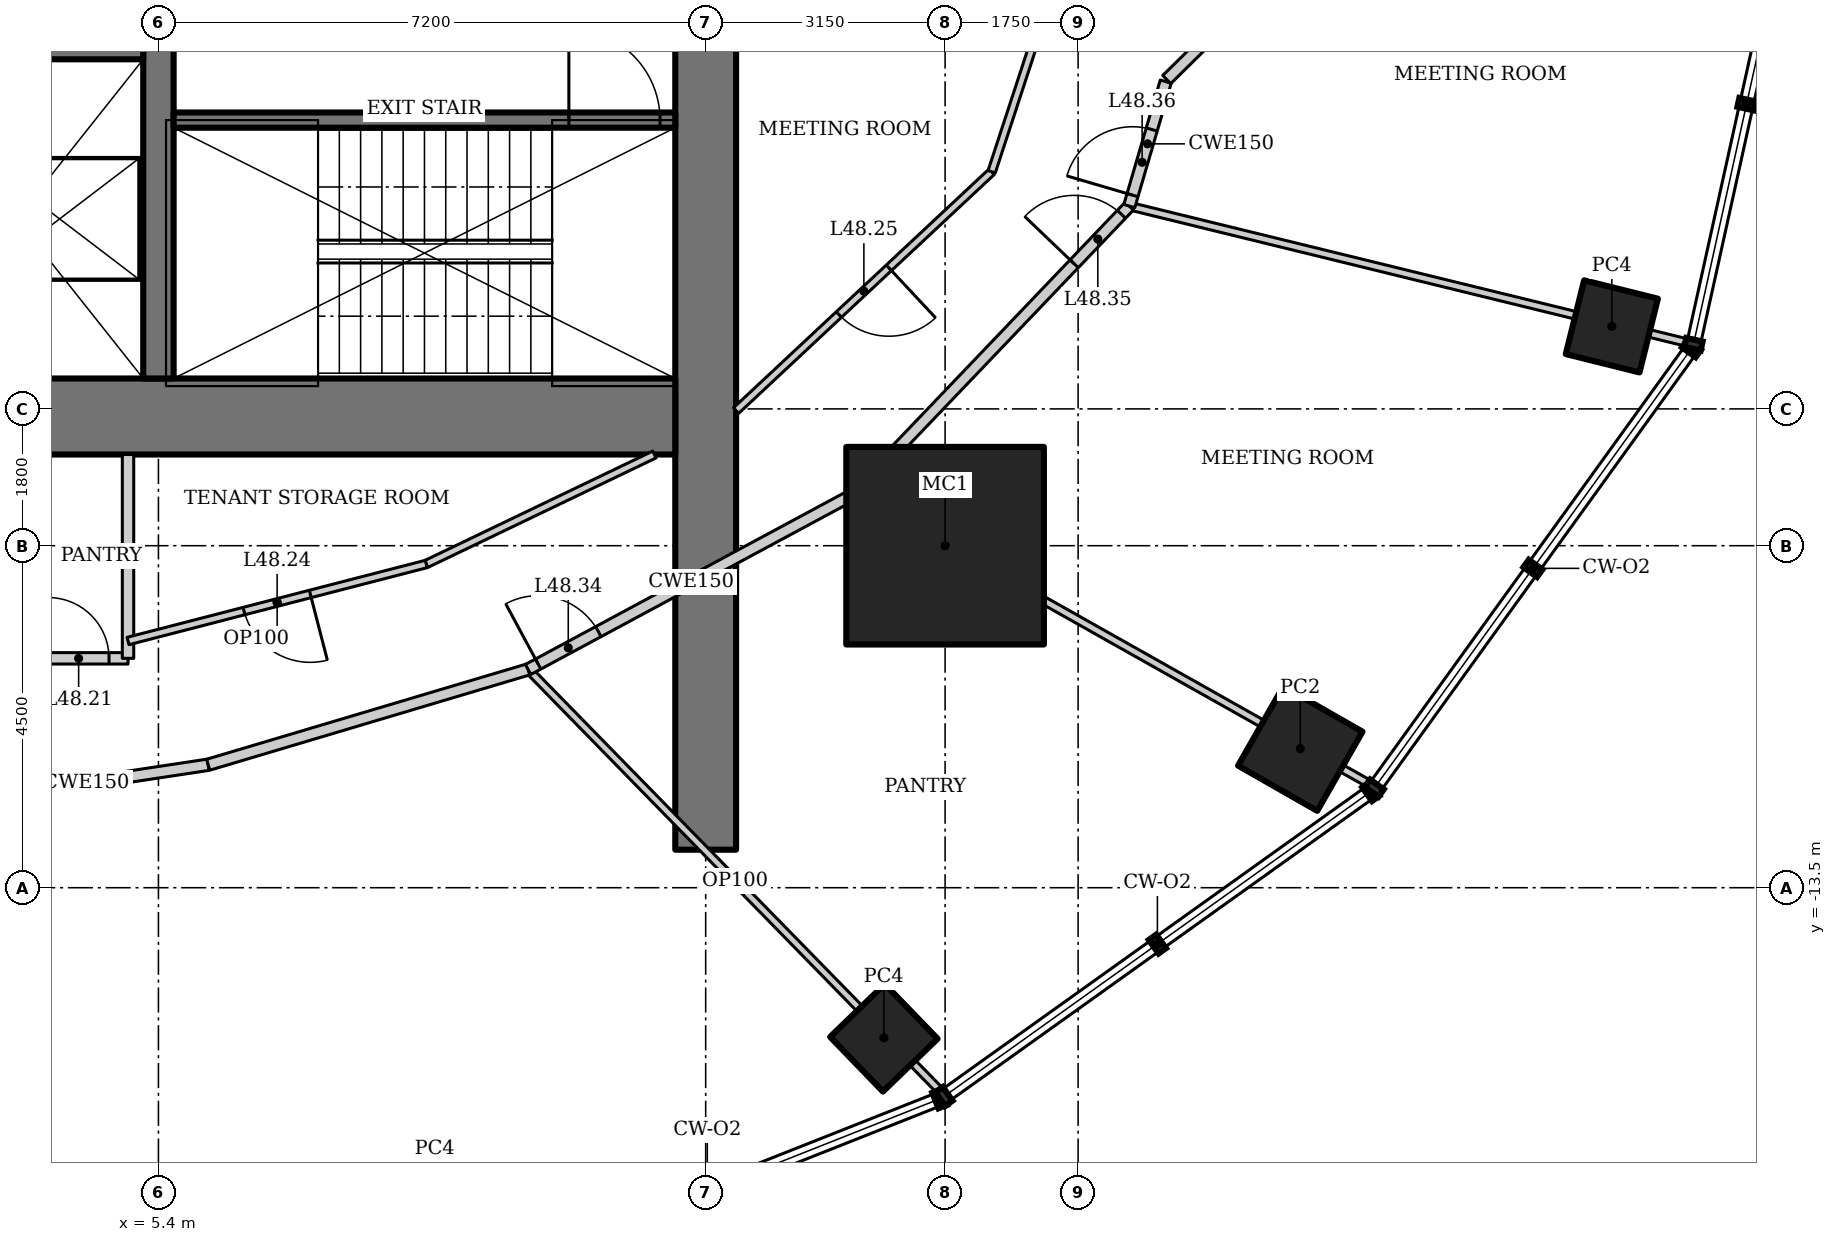
"""IFC4 building model, lengths in metres.
Left out: names, types, materials, properties, quantities, classifications, styles, units other than length and angle.
Written with IfcOpenShell. Run it as: python <this file> out.ifc"""

import sys

from ifc_helpers import new_model, si_unit, direction, frame, frame_2d, origin, origin_2d, place, context, subcontext, project, spatial, rectangle, hollow_rectangle, extrude, element, fill, save


model = new_model("IFC4")
c1 = context("Model", 3, precision=1e-05, world=origin(), true_north=direction((0.0, 1.0)))
c2 = subcontext(c1, "Body", "Model", "MODEL_VIEW")
j1 = project(units=[si_unit("LENGTHUNIT", "METRE"), si_unit("PLANEANGLEUNIT", "RADIAN")], contexts=[c1])
p1 = place(None, origin())
s1 = spatial("IfcSite", under=j1, at=p1, CompositionType="ELEMENT")
p2 = place(p1, origin())
s2 = spatial("IfcBuilding", under=s1, at=p2, CompositionType="ELEMENT")
p3 = place(p2, frame((0.0, 0.0, 207.4)))
s3 = spatial("IfcBuildingStorey", under=s2, at=p3, CompositionType="ELEMENT", Elevation=207.4)
p4 = place(p3, frame((15.75, -9.0, 0.0), z_axis=(0.0, 0.0, 1.0), x_axis=(1.0, 0.0, 0.0)))
e1 = element("IfcColumn", 1, at=p4, inside=s3, PredefinedType="COLUMN", context=c2, shape_type="SweptSolid", body=[
    extrude(hollow_rectangle(XDim=2.6, YDim=2.6, WallThickness=0.13, at=origin_2d()), origin(), (0.0, 0.0, 1.0), 4.2),
])
for number, where, z_axis, x_axis in (
    (2, (9.035, -17.731, 0.0), (0.0, 0.0, 1.0), (0.891, 0.454, 0.0)),
    (3, (14.944, -15.475, 0.0), (0.0, 0.0, 1.0), (0.719, 0.695, 0.0)),
):
    element("IfcColumn", number, at=place(p3, frame(where, z_axis=z_axis, x_axis=x_axis)), inside=s3, PredefinedType="COLUMN", context=c2, shape_type="SweptSolid", body=[
        extrude(hollow_rectangle(XDim=1.0, YDim=1.0, WallThickness=0.08, at=origin_2d()), origin(), (0.0, 0.0, 1.0), 4.2),
    ])
p5 = place(p3, frame((20.423, -11.67, 0.0), z_axis=(0.0, 0.0, 1.0), x_axis=(0.496139221777, 0.86824298017, 0.0)))
e4 = element("IfcColumn", 4, at=p5, inside=s3, PredefinedType="COLUMN", context=c2, shape_type="SweptSolid", body=[
    extrude(hollow_rectangle(XDim=1.2, YDim=1.2, WallThickness=0.1, at=origin_2d()), origin(), (0.0, 0.0, 1.0), 4.2),
])
p6 = place(p3, frame((24.522, -6.114, 0.0), z_axis=(0.0, 0.0, 1.0), x_axis=(0.2419218956, 0.970295726276, 0.0)))
e5 = element("IfcColumn", 5, at=p6, inside=s3, PredefinedType="COLUMN", context=c2, shape_type="SweptSolid", body=[
    extrude(hollow_rectangle(XDim=1.0, YDim=1.0, WallThickness=0.08, at=origin_2d()), origin(), (0.0, 0.0, 1.0), 4.2),
])
p7 = place(p3, frame((12.6, -13.0, 0.0), z_axis=(0.0, 0.0, 1.0), x_axis=(0.0, 1.0, 0.0)))
e6 = element("IfcWall", 6, at=p7, inside=s3, PredefinedType="SHEAR", context=c2, shape_type="SweptSolid", body=[
    extrude(rectangle(XDim=26.0, YDim=0.8, at=frame_2d((13.0, 0.0))), origin(), (0.0, 0.0, 1.0), 4.2),
])
p8 = place(p7, frame((12.1, 0.0, 0.0)))
e7 = element("IfcOpeningElement", 7, at=p8, cuts=e6, PredefinedType="OPENING", context=c2, shape_type="SweptSolid", body=[
    extrude(rectangle(XDim=1.8, YDim=2.1, at=frame_2d((0.9, 1.05))), frame((0.0, 0.41, 0.0), z_axis=(0.0, -1.0, 0.0), x_axis=(1.0, 0.0, 0.0)), (0.0, 0.0, 1.0), 0.82),
])
p9 = place(p3, frame((-12.2, -7.3, 0.0), z_axis=(0.0, 0.0, 1.0), x_axis=(1.0, 0.0, 0.0)))
e8 = element("IfcWall", 8, at=p9, inside=s3, PredefinedType="SHEAR", context=c2, shape_type="SweptSolid", body=[
    extrude(rectangle(XDim=24.4, YDim=1.0, at=frame_2d((12.2, 0.0))), origin(), (0.0, 0.0, 1.0), 4.2),
])
p10 = place(p3, frame((5.4, -6.8, 0.0), z_axis=(0.0, 0.0, 1.0), x_axis=(0.0, 1.0, 0.0)))
e9 = element("IfcWall", 9, at=p10, inside=s3, PredefinedType="SHEAR", context=c2, shape_type="SweptSolid", body=[
    extrude(rectangle(XDim=14.6, YDim=0.4, at=frame_2d((7.3, 0.0))), origin(), (0.0, 0.0, 1.0), 4.2),
])
p11 = place(p10, frame((5.9, 0.0, 0.0)))
e10 = element("IfcOpeningElement", 10, at=p11, cuts=e9, PredefinedType="OPENING", context=c2, shape_type="SweptSolid", body=[
    extrude(rectangle(XDim=1.8, YDim=2.1, at=frame_2d((0.9, 1.05))), frame((0.0, 0.21, 0.0), z_axis=(0.0, -1.0, 0.0), x_axis=(1.0, 0.0, 0.0)), (0.0, 0.0, 1.0), 0.42),
])
p12 = place(p3, frame((-5.2, -2.4, 0.0), z_axis=(0.0, 0.0, 1.0), x_axis=(1.0, 0.0, 0.0)))
e11 = element("IfcWall", 11, at=p12, inside=s3, PredefinedType="SHEAR", context=c2, shape_type="SweptSolid", body=[
    extrude(rectangle(XDim=10.4, YDim=0.4, at=frame_2d((5.2, 0.0))), origin(), (0.0, 0.0, 1.0), 4.2),
])
p13 = place(p12, frame((1.683, 0.0, 0.0)))
e12 = element("IfcOpeningElement", 12, at=p13, cuts=e11, PredefinedType="OPENING", context=c2, shape_type="SweptSolid", body=[
    extrude(rectangle(XDim=1.1, YDim=2.2, at=frame_2d((0.55, 1.1))), frame((0.0, 0.21, 0.0), z_axis=(0.0, -1.0, 0.0), x_axis=(1.0, 0.0, 0.0)), (0.0, 0.0, 1.0), 0.42),
])
p14 = place(p12, frame((5.217, 0.0, 0.0)))
e13 = element("IfcOpeningElement", 13, at=p14, cuts=e11, PredefinedType="OPENING", context=c2, shape_type="SweptSolid", body=[
    extrude(rectangle(XDim=1.1, YDim=2.2, at=frame_2d((0.55, 1.1))), frame((0.0, 0.21, 0.0), z_axis=(0.0, -1.0, 0.0), x_axis=(1.0, 0.0, 0.0)), (0.0, 0.0, 1.0), 0.42),
])
p15 = place(p12, frame((8.75, 0.0, 0.0)))
e14 = element("IfcOpeningElement", 14, at=p15, cuts=e11, PredefinedType="OPENING", context=c2, shape_type="SweptSolid", body=[
    extrude(rectangle(XDim=1.1, YDim=2.2, at=frame_2d((0.55, 1.1))), frame((0.0, 0.21, 0.0), z_axis=(0.0, -1.0, 0.0), x_axis=(1.0, 0.0, 0.0)), (0.0, 0.0, 1.0), 0.42),
])
p16 = place(p3, frame((5.6, -3.4, 0.0), z_axis=(0.0, 0.0, 1.0), x_axis=(1.0, 0.0, 0.0)))
e15 = element("IfcWall", 15, at=p16, inside=s3, PredefinedType="SHEAR", context=c2, shape_type="SweptSolid", body=[
    extrude(rectangle(XDim=6.6, YDim=0.2, at=frame_2d((3.3, 0.0))), origin(), (0.0, 0.0, 1.0), 4.2),
])
p17 = place(p16, frame((5.2, 0.0, 0.0)))
e16 = element("IfcOpeningElement", 16, at=p17, cuts=e15, PredefinedType="OPENING", context=c2, shape_type="SweptSolid", body=[
    extrude(rectangle(XDim=1.2, YDim=2.1, at=frame_2d((0.6, 1.05))), frame((0.0, 0.11, 0.0), z_axis=(0.0, -1.0, 0.0), x_axis=(1.0, 0.0, 0.0)), (0.0, 0.0, 1.0), 0.22),
])
p18 = place(p3, frame((15.709, -16.199, 0.0), z_axis=(0.0, 0.0, 1.0), x_axis=(-0.699053895446, 0.715068983569, 0.0)))
e17 = element("IfcWall", 17, at=p18, inside=s3, PredefinedType="PARTITIONING", context=c2, shape_type="SweptSolid", body=[
    extrude(rectangle(XDim=7.79, YDim=0.1, at=frame_2d((3.895, 0.0))), origin(), (0.0, 0.0, 1.0), 3.41),
])
p19 = place(p3, frame((21.358, -12.15, 0.0), z_axis=(0.0, 0.0, 1.0), x_axis=(-0.871273053995, 0.490798599614, 0.0)))
e18 = element("IfcWall", 18, at=p19, inside=s3, PredefinedType="PARTITIONING", context=c2, shape_type="SweptSolid", body=[
    extrude(rectangle(XDim=7.807, YDim=0.1, at=frame_2d((3.904, 0.0))), origin(), (0.0, 0.0, 1.0), 3.522),
])
p20 = place(p3, frame((25.543, -6.336, 0.0), z_axis=(0.0, 0.0, 1.0), x_axis=(-0.97130474594, 0.237838370569, 0.0)))
e19 = element("IfcWall", 19, at=p20, inside=s3, PredefinedType="PARTITIONING", context=c2, shape_type="SweptSolid", body=[
    extrude(rectangle(XDim=7.587, YDim=0.1, at=frame_2d((3.793, 0.0))), origin(), (0.0, 0.0, 1.0), 3.108),
])
p21 = place(p3, frame((2.855, -12.365, 0.0), z_axis=(0.0, 0.0, 1.0), x_axis=(0.988800347251, 0.149244340852, 0.0)))
e20 = element("IfcWall", 20, at=p21, inside=s3, PredefinedType="PARTITIONING", context=c2, shape_type="SweptSolid", body=[
    extrude(rectangle(XDim=3.236, YDim=0.15, at=frame_2d((1.618, 0.0))), origin(), (0.0, 0.0, 1.0), 4.05),
])
p22 = place(p3, frame((6.054, -11.882, 0.0), z_axis=(0.0, 0.0, 1.0), x_axis=(0.958384389306, 0.285480931648, 0.0)))
e21 = element("IfcWall", 21, at=p22, inside=s3, PredefinedType="PARTITIONING", context=c2, shape_type="SweptSolid", body=[
    extrude(rectangle(XDim=4.392, YDim=0.15, at=frame_2d((2.196, 0.0))), origin(), (0.0, 0.0, 1.0), 4.05),
])
p23 = place(p3, frame((10.264, -10.628, 0.0), z_axis=(0.0, 0.0, 1.0), x_axis=(0.88053863253, 0.47397438393, 0.0)))
e22 = element("IfcWall", 22, at=p23, inside=s3, PredefinedType="PARTITIONING", context=c2, shape_type="SweptSolid", body=[
    extrude(rectangle(XDim=4.875, YDim=0.15, at=frame_2d((2.438, 0.0))), origin(), (0.0, 0.0, 1.0), 4.05),
])
p24 = place(p23, frame((0.15, 0.0, 0.0)))
e23 = element("IfcOpeningElement", 23, at=p24, cuts=e22, PredefinedType="OPENING", context=c2, shape_type="SweptSolid", body=[
    extrude(rectangle(XDim=0.9, YDim=2.1, at=frame_2d((0.45, 1.05))), frame((0.0, 0.085, 0.0), z_axis=(0.0, -1.0, 0.0), x_axis=(1.0, 0.0, 0.0)), (0.0, 0.0, 1.0), 0.17),
])
p25 = place(p3, frame((14.556, -8.318, 0.0), z_axis=(0.0, 0.0, 1.0), x_axis=(0.690768413292, 0.723076067366, 0.0)))
e24 = element("IfcWall", 24, at=p25, inside=s3, PredefinedType="PARTITIONING", context=c2, shape_type="SweptSolid", body=[
    extrude(rectangle(XDim=5.237, YDim=0.15, at=frame_2d((2.618, 0.0))), origin(), (0.0, 0.0, 1.0), 4.05),
])
p26 = place(p25, frame((4.187, 0.0, 0.0)))
e25 = element("IfcOpeningElement", 25, at=p26, cuts=e24, PredefinedType="OPENING", context=c2, shape_type="SweptSolid", body=[
    extrude(rectangle(XDim=0.9, YDim=2.1, at=frame_2d((0.45, 1.05))), frame((0.0, 0.085, 0.0), z_axis=(0.0, -1.0, 0.0), x_axis=(1.0, 0.0, 0.0)), (0.0, 0.0, 1.0), 0.17),
])
p27 = place(p3, frame((-5.0, -10.482, 0.0), z_axis=(0.0, 0.0, 1.0), x_axis=(1.0, 0.0, 0.0)))
e26 = element("IfcWall", 26, at=p27, inside=s3, PredefinedType="SOLIDWALL", context=c2, shape_type="SweptSolid", body=[
    extrude(rectangle(XDim=10.0, YDim=0.15, at=frame_2d((5.0, 0.0))), origin(), (0.0, 0.0, 1.0), 4.05),
])
p28 = place(p27, frame((1.25, 0.0, 0.0)))
e27 = element("IfcOpeningElement", 27, at=p28, cuts=e26, PredefinedType="OPENING", context=c2, shape_type="SweptSolid", body=[
    extrude(rectangle(XDim=0.9, YDim=2.1, at=frame_2d((0.45, 1.05))), frame((0.0, 0.085, 0.0), z_axis=(0.0, -1.0, 0.0), x_axis=(1.0, 0.0, 0.0)), (0.0, 0.0, 1.0), 0.17),
])
p29 = place(p27, frame((4.65, 0.0, 0.0)))
e28 = element("IfcOpeningElement", 28, at=p29, cuts=e26, PredefinedType="OPENING", context=c2, shape_type="SweptSolid", body=[
    extrude(rectangle(XDim=0.9, YDim=2.1, at=frame_2d((0.45, 1.05))), frame((0.0, 0.085, 0.0), z_axis=(0.0, -1.0, 0.0), x_axis=(1.0, 0.0, 0.0)), (0.0, 0.0, 1.0), 0.17),
])
p30 = place(p27, frame((7.25, 0.0, 0.0)))
e29 = element("IfcOpeningElement", 29, at=p30, cuts=e26, PredefinedType="OPENING", context=c2, shape_type="SweptSolid", body=[
    extrude(rectangle(XDim=1.0, YDim=2.1, at=frame_2d((0.5, 1.05))), frame((0.0, 0.085, 0.0), z_axis=(0.0, -1.0, 0.0), x_axis=(1.0, 0.0, 0.0)), (0.0, 0.0, 1.0), 0.17),
])
p31 = place(p27, frame((8.95, 0.0, 0.0)))
e30 = element("IfcOpeningElement", 30, at=p31, cuts=e26, PredefinedType="OPENING", context=c2, shape_type="SweptSolid", body=[
    extrude(rectangle(XDim=0.8, YDim=2.1, at=frame_2d((0.4, 1.05))), frame((0.0, 0.085, 0.0), z_axis=(0.0, -1.0, 0.0), x_axis=(1.0, 0.0, 0.0)), (0.0, 0.0, 1.0), 0.17),
])
p32 = place(p3, frame((5.0, -7.8, 0.0), z_axis=(0.0, 0.0, 1.0), x_axis=(0.0, -1.0, 0.0)))
e31 = element("IfcWall", 31, at=p32, inside=s3, PredefinedType="SOLIDWALL", context=c2, shape_type="SweptSolid", body=[
    extrude(rectangle(XDim=2.682, YDim=0.15, at=frame_2d((1.341, 0.0))), origin(), (0.0, 0.0, 1.0), 4.05),
])
p33 = place(p3, frame((11.926, -7.8, 0.0), z_axis=(0.0, 0.0, 1.0), x_axis=(-0.901553947207, -0.432666708073, 0.0)))
e32 = element("IfcWall", 32, at=p33, inside=s3, PredefinedType="PARTITIONING", context=c2, shape_type="SweptSolid", body=[
    extrude(rectangle(XDim=3.33, YDim=0.1, at=frame_2d((1.665, 0.0))), origin(), (0.0, 0.0, 1.0), 4.05),
])
p34 = place(p3, frame((8.924, -9.241, 0.0), z_axis=(0.0, 0.0, 1.0), x_axis=(-0.968224167198, -0.250083910027, 0.0)))
e33 = element("IfcWall", 33, at=p34, inside=s3, PredefinedType="PARTITIONING", context=c2, shape_type="SweptSolid", body=[
    extrude(rectangle(XDim=4.052, YDim=0.1, at=frame_2d((2.026, 0.0))), origin(), (0.0, 0.0, 1.0), 4.05),
])
p35 = place(p34, frame((1.576, 0.0, 0.0)))
e34 = element("IfcOpeningElement", 34, at=p35, cuts=e33, PredefinedType="OPENING", context=c2, shape_type="SweptSolid", body=[
    extrude(rectangle(XDim=0.9, YDim=2.1, at=frame_2d((0.45, 1.05))), frame((0.0, 0.06, 0.0), z_axis=(0.0, -1.0, 0.0), x_axis=(1.0, 0.0, 0.0)), (0.0, 0.0, 1.0), 0.12),
])
p36 = place(p3, frame((16.363, -4.08, 0.0), z_axis=(0.0, 0.0, 1.0), x_axis=(-0.730651186567, -0.682750938167, 0.0)))
e35 = element("IfcWall", 35, at=p36, inside=s3, PredefinedType="PARTITIONING", context=c2, shape_type="SweptSolid", body=[
    extrude(rectangle(XDim=4.603, YDim=0.1, at=frame_2d((2.301, 0.0))), origin(), (0.0, 0.0, 1.0), 4.05),
])
p37 = place(p36, frame((1.851, 0.0, 0.0)))
e36 = element("IfcOpeningElement", 36, at=p37, cuts=e35, PredefinedType="OPENING", context=c2, shape_type="SweptSolid", body=[
    extrude(rectangle(XDim=0.9, YDim=2.1, at=frame_2d((0.45, 1.05))), frame((0.0, 0.06, 0.0), z_axis=(0.0, -1.0, 0.0), x_axis=(1.0, 0.0, 0.0)), (0.0, 0.0, 1.0), 0.12),
])
p38 = place(p3, frame((18.174, -4.531, 0.0), z_axis=(0.0, 0.0, 1.0), x_axis=(0.281027335084, 0.959699763955, 0.0)))
e37 = element("IfcWall", 37, at=p38, inside=s3, PredefinedType="PARTITIONING", context=c2, shape_type="SweptSolid", body=[
    extrude(rectangle(XDim=1.706, YDim=0.15, at=frame_2d((0.853, 0.0))), origin(), (0.0, 0.0, 1.0), 4.05),
])
p39 = place(p38, frame((0.15, 0.0, 0.0)))
e38 = element("IfcOpeningElement", 38, at=p39, cuts=e37, PredefinedType="OPENING", context=c2, shape_type="SweptSolid", body=[
    extrude(rectangle(XDim=0.9, YDim=2.1, at=frame_2d((0.45, 1.05))), frame((0.0, 0.085, 0.0), z_axis=(0.0, -1.0, 0.0), x_axis=(1.0, 0.0, 0.0)), (0.0, 0.0, 1.0), 0.17),
])
p40 = place(p3, frame((16.935, -2.335, 0.0), z_axis=(0.0, 0.0, 1.0), x_axis=(-0.311517212063, -0.950240509865, 0.0)))
e39 = element("IfcWall", 39, at=p40, inside=s3, PredefinedType="PARTITIONING", context=c2, shape_type="SweptSolid", body=[
    extrude(rectangle(XDim=1.836, YDim=0.1, at=frame_2d((0.918, 0.0))), origin(), (0.0, 0.0, 1.0), 4.05),
])
p41 = place(p3, frame((19.825, -1.725, 0.0), z_axis=(0.0, 0.0, 1.0), x_axis=(-0.712265481509, -0.701910167935, 0.0)))
e40 = element("IfcWall", 40, at=p41, inside=s3, PredefinedType="PARTITIONING", context=c2, shape_type="SweptSolid", body=[
    extrude(rectangle(XDim=1.627, YDim=0.15, at=frame_2d((0.813, 0.0))), origin(), (0.0, 0.0, 1.0), 4.05),
])
p42 = place(p17, origin())
e41 = element("IfcDoor", 41, at=p42, inside=s3, OperationType="SINGLE_SWING_RIGHT", PredefinedType="DOOR", context=c2, shape_type="SweptSolid", body=[
    extrude(rectangle(XDim=1.2, YDim=2.1, at=frame_2d((0.6, 1.05))), frame((0.0, 0.025, 0.0), z_axis=(0.0, -1.0, 0.0), x_axis=(1.0, 0.0, 0.0)), (0.0, 0.0, 1.0), 0.05),
])
fill(e16, e41)
p43 = place(p31, origin())
e42 = element("IfcDoor", 42, at=p43, inside=s3, OperationType="SINGLE_SWING_LEFT", PredefinedType="DOOR", context=c2, shape_type="SweptSolid", body=[
    extrude(rectangle(XDim=0.8, YDim=2.1, at=frame_2d((0.4, 1.05))), frame((0.0, 0.025, 0.0), z_axis=(0.0, -1.0, 0.0), x_axis=(1.0, 0.0, 0.0)), (0.0, 0.0, 1.0), 0.05),
])
fill(e30, e42)
p44 = place(p35, origin())
e43 = element("IfcDoor", 43, at=p44, inside=s3, OperationType="SINGLE_SWING_LEFT", PredefinedType="DOOR", context=c2, shape_type="SweptSolid", body=[
    extrude(rectangle(XDim=0.9, YDim=2.1, at=frame_2d((0.45, 1.05))), frame((0.0, 0.025, 0.0), z_axis=(0.0, -1.0, 0.0), x_axis=(1.0, 0.0, 0.0)), (0.0, 0.0, 1.0), 0.05),
])
fill(e34, e43)
p45 = place(p37, origin())
e44 = element("IfcDoor", 44, at=p45, inside=s3, OperationType="SINGLE_SWING_LEFT", PredefinedType="DOOR", context=c2, shape_type="SweptSolid", body=[
    extrude(rectangle(XDim=0.9, YDim=2.1, at=frame_2d((0.45, 1.05))), frame((0.0, 0.025, 0.0), z_axis=(0.0, -1.0, 0.0), x_axis=(1.0, 0.0, 0.0)), (0.0, 0.0, 1.0), 0.05),
])
fill(e36, e44)
p46 = place(p24, origin())
e45 = element("IfcDoor", 45, at=p46, inside=s3, OperationType="SINGLE_SWING_LEFT", PredefinedType="DOOR", context=c2, shape_type="SweptSolid", body=[
    extrude(rectangle(XDim=0.9, YDim=2.1, at=frame_2d((0.45, 1.05))), frame((0.0, 0.025, 0.0), z_axis=(0.0, -1.0, 0.0), x_axis=(1.0, 0.0, 0.0)), (0.0, 0.0, 1.0), 0.05),
])
fill(e23, e45)
p47 = place(p26, origin())
e46 = element("IfcDoor", 46, at=p47, inside=s3, OperationType="SINGLE_SWING_LEFT", PredefinedType="DOOR", context=c2, shape_type="SweptSolid", body=[
    extrude(rectangle(XDim=0.9, YDim=2.1, at=frame_2d((0.45, 1.05))), frame((0.0, 0.025, 0.0), z_axis=(0.0, -1.0, 0.0), x_axis=(1.0, 0.0, 0.0)), (0.0, 0.0, 1.0), 0.05),
])
fill(e25, e46)
p48 = place(p39, origin())
e47 = element("IfcDoor", 47, at=p48, inside=s3, OperationType="SINGLE_SWING_LEFT", PredefinedType="DOOR", context=c2, shape_type="SweptSolid", body=[
    extrude(rectangle(XDim=0.9, YDim=2.1, at=frame_2d((0.45, 1.05))), frame((0.0, 0.025, 0.0), z_axis=(0.0, -1.0, 0.0), x_axis=(1.0, 0.0, 0.0)), (0.0, 0.0, 1.0), 0.05),
])
fill(e38, e47)
save(model, sys.argv[1])
